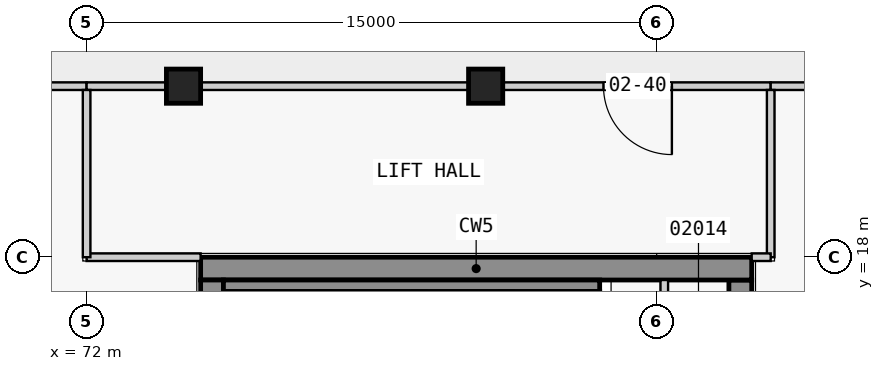
"""IFC4 building model, lengths in metres.
Left out: names, types, materials, properties, quantities, classifications, styles, units other than length and angle.
Written with IfcOpenShell. Run it as: python <this file> out.ifc"""

import sys

from ifc_helpers import new_model, si_unit, direction, frame, frame_2d, origin, origin_2d, place, context, subcontext, project, spatial, rectangle, extrude, element, fill, save


model = new_model("IFC4")
c1 = context("Model", 3, precision=1e-05, world=origin(), true_north=direction((0.0, 1.0)))
c2 = subcontext(c1, "Body", "Model", "MODEL_VIEW")
j1 = project(units=[si_unit("LENGTHUNIT", "METRE"), si_unit("PLANEANGLEUNIT", "RADIAN")], contexts=[c1])
p1 = place(None, origin())
s1 = spatial("IfcSite", under=j1, at=p1, CompositionType="ELEMENT")
p2 = place(p1, origin())
s2 = spatial("IfcBuilding", under=s1, at=p2, CompositionType="ELEMENT")
p3 = place(p2, frame((0.0, 0.0, 12.8)))
s3 = spatial("IfcBuildingStorey", under=s2, at=p3, CompositionType="ELEMENT", Elevation=12.8)
for number, where, z_axis, x_axis in (
    (1, (82.5, 22.5, 0.0), (0.0, 0.0, 1.0), (1.0, 0.0, 0.0)),
    (2, (74.55, 22.5, 0.0), (0.0, 0.0, 1.0), (1.0, 0.0, 0.0)),
):
    element("IfcColumn", number, at=place(p3, frame(where, z_axis=z_axis, x_axis=x_axis)), inside=s3, PredefinedType="COLUMN", context=c2, shape_type="SweptSolid", body=[
        extrude(rectangle(XDim=0.9, YDim=0.9, at=origin_2d()), origin(), (0.0, 0.0, 1.0), 4.5),
    ])
p4 = place(p3, frame((75.0, 17.7, 0.0), z_axis=(0.0, 0.0, 1.0), x_axis=(1.0, 0.0, 0.0)))
e3 = element("IfcWall", 3, at=p4, inside=s3, PredefinedType="SHEAR", context=c2, shape_type="SweptSolid", body=[
    extrude(rectangle(XDim=14.5, YDim=0.6, at=frame_2d((7.25, 0.0))), origin(), (0.0, 0.0, 1.0), 4.15),
])
p5 = place(p3, frame((75.3, 0.6, 0.0), z_axis=(0.0, 0.0, 1.0), x_axis=(0.0, 1.0, 0.0)))
e4 = element("IfcWall", 4, at=p5, inside=s3, PredefinedType="SHEAR", context=c2, shape_type="SweptSolid", body=[
    extrude(rectangle(XDim=16.8, YDim=0.6, at=frame_2d((8.4, 0.0))), origin(), (0.0, 0.0, 1.0), 4.15),
])
p6 = place(p5, frame((7.8, 0.0, 0.0)))
e5 = element("IfcOpeningElement", 5, at=p6, cuts=e4, PredefinedType="OPENING", context=c2, shape_type="SweptSolid", body=[
    extrude(rectangle(XDim=1.8, YDim=2.1, at=frame_2d((0.9, 1.05))), frame((0.0, 0.31, 0.0), z_axis=(0.0, -1.0, 0.0), x_axis=(1.0, 0.0, 0.0)), (0.0, 0.0, 1.0), 0.62),
])
p7 = place(p3, frame((89.2, 0.6, 0.0), z_axis=(0.0, 0.0, 1.0), x_axis=(0.0, 1.0, 0.0)))
e6 = element("IfcWall", 6, at=p7, inside=s3, PredefinedType="SHEAR", context=c2, shape_type="SweptSolid", body=[
    extrude(rectangle(XDim=16.8, YDim=0.6, at=frame_2d((8.4, 0.0))), origin(), (0.0, 0.0, 1.0), 4.15),
])
p8 = place(p7, frame((7.5, 0.0, 0.0)))
e7 = element("IfcOpeningElement", 7, at=p8, cuts=e6, PredefinedType="OPENING", context=c2, shape_type="SweptSolid", body=[
    extrude(rectangle(XDim=1.8, YDim=2.1, at=frame_2d((0.9, 1.05))), frame((0.0, 0.31, 0.0), z_axis=(0.0, -1.0, 0.0), x_axis=(1.0, 0.0, 0.0)), (0.0, 0.0, 1.0), 0.62),
])
p9 = place(p3, frame((75.6, 17.25, 0.0), z_axis=(0.0, 0.0, 1.0), x_axis=(1.0, 0.0, 0.0)))
e8 = element("IfcWall", 8, at=p9, inside=s3, PredefinedType="SHEAR", context=c2, shape_type="SweptSolid", body=[
    extrude(rectangle(XDim=9.9, YDim=0.3, at=frame_2d((4.95, 0.0))), origin(), (0.0, 0.0, 1.0), 4.15),
])
p10 = place(p3, frame((87.2, 14.25, 0.0), z_axis=(0.0, 0.0, 1.0), x_axis=(0.0, 1.0, 0.0)))
e9 = element("IfcWall", 9, at=p10, inside=s3, PredefinedType="PARTITIONING", context=c2, shape_type="SweptSolid", body=[
    extrude(rectangle(XDim=3.15, YDim=0.2, at=frame_2d((1.575, 0.0))), origin(), (0.0, 0.0, 1.0), 4.15),
])
p11 = place(p3, frame((72.0, 22.5, 0.0), z_axis=(0.0, 0.0, 1.0), x_axis=(-1.0, 0.0, 0.0)))
e10 = element("IfcWall", 10, at=p11, inside=s3, PredefinedType="PARTITIONING", context=c2, shape_type="SweptSolid", body=[
    extrude(rectangle(XDim=27.0, YDim=0.2, at=frame_2d((13.5, 0.0))), origin(), (0.0, 0.0, 1.0), 3.45),
])
p12 = place(p11, frame((12.6, 0.0, 0.0)))
e11 = element("IfcOpeningElement", 11, at=p12, cuts=e10, PredefinedType="OPENING", context=c2, shape_type="SweptSolid", body=[
    extrude(rectangle(XDim=1.8, YDim=2.1, at=frame_2d((0.9, 1.05))), frame((0.0, 0.11, 0.0), z_axis=(0.0, -1.0, 0.0), x_axis=(1.0, 0.0, 0.0)), (0.0, 0.0, 1.0), 0.22),
])
p13 = place(p3, frame((90.0, 22.5, 0.0), z_axis=(0.0, 0.0, 1.0), x_axis=(-1.0, 0.0, 0.0)))
e12 = element("IfcWall", 12, at=p13, inside=s3, PredefinedType="PARTITIONING", context=c2, shape_type="SweptSolid", body=[
    extrude(rectangle(XDim=7.05, YDim=0.2, at=frame_2d((3.525, 0.0))), origin(), (0.0, 0.0, 1.0), 4.15),
])
p14 = place(p13, frame((2.6, 0.0, 0.0)))
e13 = element("IfcOpeningElement", 13, at=p14, cuts=e12, PredefinedType="OPENING", context=c2, shape_type="SweptSolid", body=[
    extrude(rectangle(XDim=1.8, YDim=2.1, at=frame_2d((0.9, 1.05))), frame((0.0, 0.11, 0.0), z_axis=(0.0, -1.0, 0.0), x_axis=(1.0, 0.0, 0.0)), (0.0, 0.0, 1.0), 0.22),
])
p15 = place(p3, frame((82.05, 22.5, 0.0), z_axis=(0.0, 0.0, 1.0), x_axis=(-1.0, 0.0, 0.0)))
e14 = element("IfcWall", 14, at=p15, inside=s3, PredefinedType="PARTITIONING", context=c2, shape_type="SweptSolid", body=[
    extrude(rectangle(XDim=7.05, YDim=0.2, at=frame_2d((3.525, 0.0))), origin(), (0.0, 0.0, 1.0), 4.15),
])
p16 = place(p3, frame((74.1, 22.5, 0.0), z_axis=(0.0, 0.0, 1.0), x_axis=(-1.0, 0.0, 0.0)))
e15 = element("IfcWall", 15, at=p16, inside=s3, PredefinedType="PARTITIONING", context=c2, shape_type="SweptSolid", body=[
    extrude(rectangle(XDim=2.1, YDim=0.2, at=frame_2d((1.05, 0.0))), origin(), (0.0, 0.0, 1.0), 4.15),
])
p17 = place(p3, frame((91.05, 22.5, 0.0), z_axis=(0.0, 0.0, 1.0), x_axis=(-1.0, 0.0, 0.0)))
e16 = element("IfcWall", 16, at=p17, inside=s3, PredefinedType="PARTITIONING", context=c2, shape_type="SweptSolid", body=[
    extrude(rectangle(XDim=1.05, YDim=0.2, at=frame_2d((0.525, 0.0))), origin(), (0.0, 0.0, 1.0), 4.15),
])
p18 = place(p3, frame((75.0, 18.0, 0.0), z_axis=(0.0, 0.0, 1.0), x_axis=(-1.0, 0.0, 0.0)))
e17 = element("IfcWall", 17, at=p18, inside=s3, PredefinedType="PARTITIONING", context=c2, shape_type="SweptSolid", body=[
    extrude(rectangle(XDim=3.0, YDim=0.2, at=frame_2d((1.5, 0.0))), origin(), (0.0, 0.0, 1.0), 4.15),
])
for number, where, z_axis, x_axis in (
    (18, (72.0, 18.0, 0.0), (0.0, 0.0, 1.0), (0.0, 1.0, 0.0)),
    (19, (90.0, 22.4, 0.0), (0.0, 0.0, 1.0), (0.0, -1.0, 0.0)),
):
    element("IfcWall", number, at=place(p3, frame(where, z_axis=z_axis, x_axis=x_axis)), inside=s3, PredefinedType="PARTITIONING", context=c2, shape_type="SweptSolid", body=[
        extrude(rectangle(XDim=4.4, YDim=0.2, at=frame_2d((2.2, 0.0))), origin(), (0.0, 0.0, 1.0), 4.15),
    ])
p19 = place(p3, frame((90.0, 18.0, 0.0), z_axis=(0.0, 0.0, 1.0), x_axis=(-1.0, 0.0, 0.0)))
e20 = element("IfcWall", 20, at=p19, inside=s3, PredefinedType="PARTITIONING", context=c2, shape_type="SweptSolid", body=[
    extrude(rectangle(XDim=0.5, YDim=0.2, at=frame_2d((0.25, 0.0))), origin(), (0.0, 0.0, 1.0), 4.15),
])
p20 = place(p14, origin())
e21 = element("IfcDoor", 21, at=p20, inside=s3, OperationType="DOUBLE_DOOR_SINGLE_SWING", PredefinedType="DOOR", context=c2, shape_type="SweptSolid", body=[
    extrude(rectangle(XDim=1.8, YDim=2.1, at=frame_2d((0.9, 1.05))), frame((0.0, 0.025, 0.0), z_axis=(0.0, -1.0, 0.0), x_axis=(1.0, 0.0, 0.0)), (0.0, 0.0, 1.0), 0.05),
])
fill(e13, e21)
save(model, sys.argv[1])
